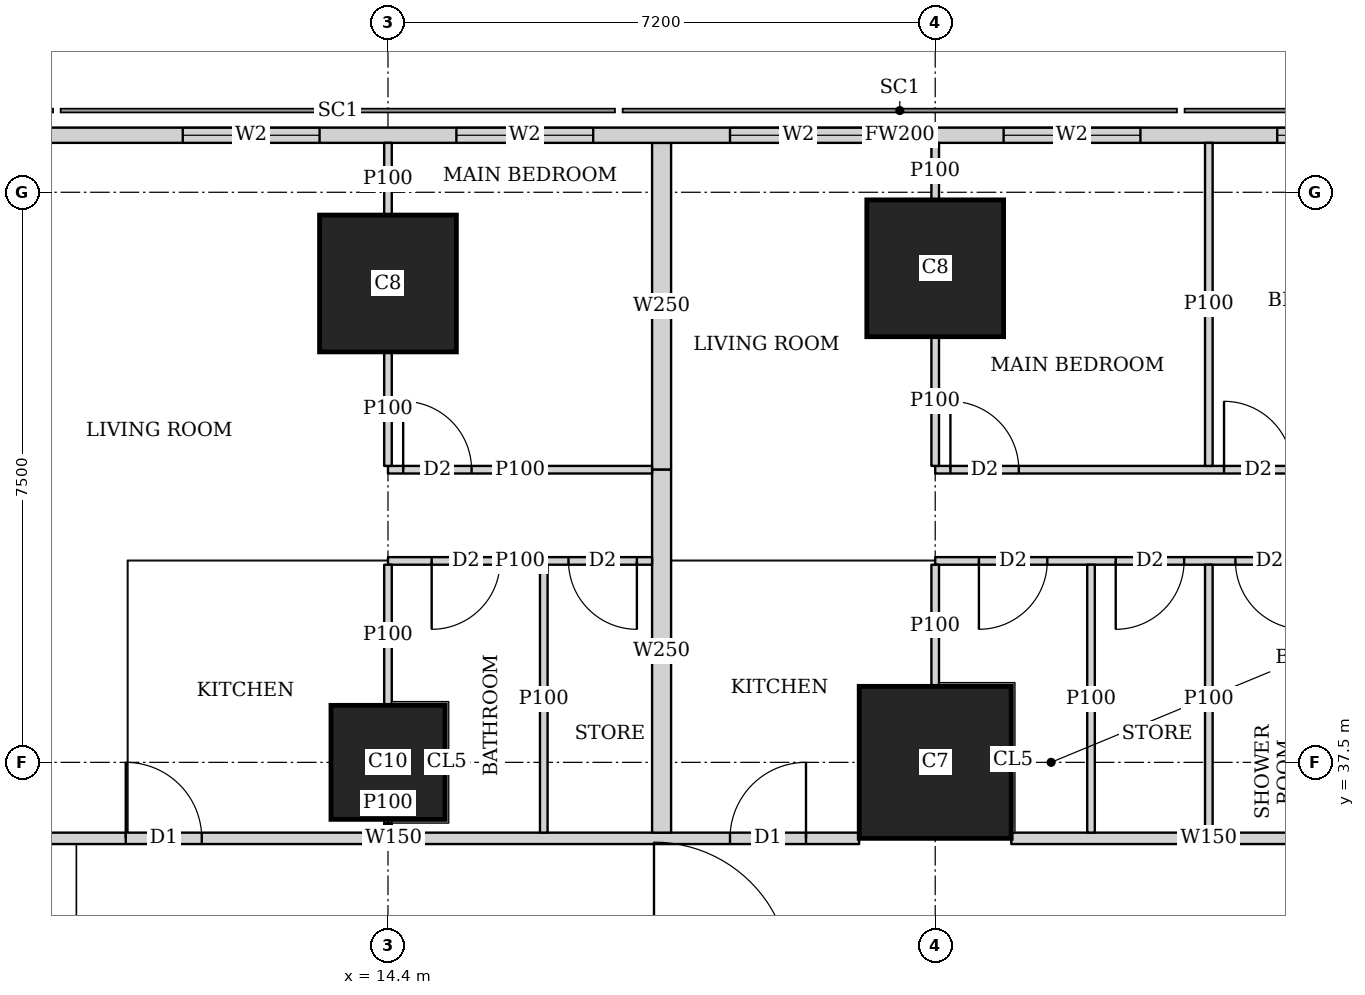
"""IFC4 building model, lengths in metres.
Left out: names, types, materials, properties, quantities, classifications, styles, units other than length and angle.
Written with IfcOpenShell. Run it as: python <this file> out.ifc"""

import sys

from ifc_helpers import new_model, si_unit, direction, frame, frame_2d, origin, origin_2d, place, context, subcontext, project, spatial, rectangle, extrude, element, fill, save


model = new_model("IFC4")
c1 = context("Model", 3, precision=1e-05, world=origin(), true_north=direction((0.0, 1.0)))
c2 = subcontext(c1, "Body", "Model", "MODEL_VIEW")
j1 = project(units=[si_unit("LENGTHUNIT", "METRE"), si_unit("PLANEANGLEUNIT", "RADIAN")], contexts=[c1])
p1 = place(None, origin())
s1 = spatial("IfcSite", under=j1, at=p1, CompositionType="ELEMENT")
p2 = place(p1, origin())
s2 = spatial("IfcBuilding", under=s1, at=p2, CompositionType="ELEMENT")
p3 = place(p2, frame((0.0, 0.0, 135.8)))
s3 = spatial("IfcBuildingStorey", under=s2, at=p3, CompositionType="ELEMENT", Elevation=135.8)
p4 = place(p3, frame((14.4, 37.5, 0.0), z_axis=(0.0, 0.0, 1.0), x_axis=(1.0, 0.0, 0.0)))
e1 = element("IfcColumn", 1, at=p4, inside=s3, PredefinedType="COLUMN", context=c2, shape_type="SweptSolid", body=[
    extrude(rectangle(XDim=1.5, YDim=1.5, at=origin_2d()), origin(), (0.0, 0.0, 1.0), 3.75),
])
p5 = place(p3, frame((21.6, 37.5, 0.0), z_axis=(0.0, 0.0, 1.0), x_axis=(1.0, 0.0, 0.0)))
e2 = element("IfcColumn", 2, at=p5, inside=s3, PredefinedType="COLUMN", context=c2, shape_type="SweptSolid", body=[
    extrude(rectangle(XDim=2.0, YDim=2.0, at=origin_2d()), origin(), (0.0, 0.0, 1.0), 3.75),
])
for number, where, z_axis, x_axis in (
    (3, (14.4, 43.8, 0.0), (0.0, 0.0, 1.0), (1.0, 0.0, 0.0)),
    (4, (21.6, 44.0, 0.0), (0.0, 0.0, 1.0), (1.0, 0.0, 0.0)),
):
    element("IfcColumn", number, at=place(p3, frame(where, z_axis=z_axis, x_axis=x_axis)), inside=s3, PredefinedType="COLUMN", context=c2, shape_type="SweptSolid", body=[
        extrude(rectangle(XDim=1.8, YDim=1.8, at=origin_2d()), origin(), (0.0, 0.0, 1.0), 3.75),
    ])
p6 = place(p3, frame((40.106, 45.75, 0.0), z_axis=(0.0, 0.0, 1.0), x_axis=(-1.0, 0.0, 0.0)))
e5 = element("IfcWall", 5, at=p6, inside=s3, PredefinedType="SOLIDWALL", context=c2, shape_type="SweptSolid", body=[
    extrude(rectangle(XDim=37.943, YDim=0.2, at=frame_2d((18.971, 0.0))), origin(), (0.0, 0.0, 1.0), 3.5),
])
p7 = place(p6, frame((8.606, 0.0, 0.9)))
e6 = element("IfcOpeningElement", 6, at=p7, cuts=e5, PredefinedType="OPENING", context=c2, shape_type="SweptSolid", body=[
    extrude(rectangle(XDim=1.8, YDim=1.5, at=frame_2d((0.9, 0.75))), frame((0.0, 0.11, 0.0), z_axis=(0.0, -1.0, 0.0), x_axis=(1.0, 0.0, 0.0)), (0.0, 0.0, 1.0), 0.22),
])
p8 = place(p6, frame((12.206, 0.0, 0.9)))
e7 = element("IfcOpeningElement", 7, at=p8, cuts=e5, PredefinedType="OPENING", context=c2, shape_type="SweptSolid", body=[
    extrude(rectangle(XDim=1.8, YDim=1.5, at=frame_2d((0.9, 0.75))), frame((0.0, 0.11, 0.0), z_axis=(0.0, -1.0, 0.0), x_axis=(1.0, 0.0, 0.0)), (0.0, 0.0, 1.0), 0.22),
])
p9 = place(p6, frame((15.806, 0.0, 0.9)))
e8 = element("IfcOpeningElement", 8, at=p9, cuts=e5, PredefinedType="OPENING", context=c2, shape_type="SweptSolid", body=[
    extrude(rectangle(XDim=1.8, YDim=1.5, at=frame_2d((0.9, 0.75))), frame((0.0, 0.11, 0.0), z_axis=(0.0, -1.0, 0.0), x_axis=(1.0, 0.0, 0.0)), (0.0, 0.0, 1.0), 0.22),
])
p10 = place(p6, frame((19.406, 0.0, 0.9)))
e9 = element("IfcOpeningElement", 9, at=p10, cuts=e5, PredefinedType="OPENING", context=c2, shape_type="SweptSolid", body=[
    extrude(rectangle(XDim=1.8, YDim=1.5, at=frame_2d((0.9, 0.75))), frame((0.0, 0.11, 0.0), z_axis=(0.0, -1.0, 0.0), x_axis=(1.0, 0.0, 0.0)), (0.0, 0.0, 1.0), 0.22),
])
p11 = place(p6, frame((23.006, 0.0, 0.9)))
e10 = element("IfcOpeningElement", 10, at=p11, cuts=e5, PredefinedType="OPENING", context=c2, shape_type="SweptSolid", body=[
    extrude(rectangle(XDim=1.8, YDim=1.5, at=frame_2d((0.9, 0.75))), frame((0.0, 0.11, 0.0), z_axis=(0.0, -1.0, 0.0), x_axis=(1.0, 0.0, 0.0)), (0.0, 0.0, 1.0), 0.22),
])
p12 = place(p6, frame((26.606, 0.0, 0.9)))
e11 = element("IfcOpeningElement", 11, at=p12, cuts=e5, PredefinedType="OPENING", context=c2, shape_type="SweptSolid", body=[
    extrude(rectangle(XDim=1.8, YDim=1.5, at=frame_2d((0.9, 0.75))), frame((0.0, 0.11, 0.0), z_axis=(0.0, -1.0, 0.0), x_axis=(1.0, 0.0, 0.0)), (0.0, 0.0, 1.0), 0.22),
])
p13 = place(p3, frame((8.35, 36.5, 0.0), z_axis=(0.0, 0.0, 1.0), x_axis=(1.0, 0.0, 0.0)))
e12 = element("IfcWall", 12, at=p13, inside=s3, PredefinedType="SOLIDWALL", context=c2, shape_type="SweptSolid", body=[
    extrude(rectangle(XDim=12.249, YDim=0.15, at=frame_2d((6.125, 0.0))), origin(), (0.0, 0.0, 1.0), 3.5),
])
p14 = place(p13, frame((2.6, 0.0, 0.0)))
e13 = element("IfcOpeningElement", 13, at=p14, cuts=e12, PredefinedType="OPENING", context=c2, shape_type="SweptSolid", body=[
    extrude(rectangle(XDim=1.0, YDim=2.1, at=frame_2d((0.5, 1.05))), frame((0.0, 0.085, 0.0), z_axis=(0.0, -1.0, 0.0), x_axis=(1.0, 0.0, 0.0)), (0.0, 0.0, 1.0), 0.17),
])
p15 = place(p13, frame((10.55, 0.0, 0.0)))
e14 = element("IfcOpeningElement", 14, at=p15, cuts=e12, PredefinedType="OPENING", context=c2, shape_type="SweptSolid", body=[
    extrude(rectangle(XDim=1.0, YDim=2.1, at=frame_2d((0.5, 1.05))), frame((0.0, 0.085, 0.0), z_axis=(0.0, -1.0, 0.0), x_axis=(1.0, 0.0, 0.0)), (0.0, 0.0, 1.0), 0.17),
])
p16 = place(p3, frame((22.601, 36.5, 0.0), z_axis=(0.0, 0.0, 1.0), x_axis=(1.0, 0.0, 0.0)))
e15 = element("IfcWall", 15, at=p16, inside=s3, PredefinedType="SOLIDWALL", context=c2, shape_type="SweptSolid", body=[
    extrude(rectangle(XDim=5.198, YDim=0.15, at=frame_2d((2.599, 0.0))), origin(), (0.0, 0.0, 1.0), 3.5),
])
p17 = place(p3, frame((14.4, 41.35, 0.0), z_axis=(0.0, 0.0, 1.0), x_axis=(1.0, 0.0, 0.0)))
e16 = element("IfcWall", 16, at=p17, inside=s3, PredefinedType="PARTITIONING", context=c2, shape_type="SweptSolid", body=[
    extrude(rectangle(XDim=3.475, YDim=0.1, at=frame_2d((1.738, 0.0))), origin(), (0.0, 0.0, 1.0), 3.5),
])
p18 = place(p17, frame((0.2, 0.0, 0.0)))
e17 = element("IfcOpeningElement", 17, at=p18, cuts=e16, PredefinedType="OPENING", context=c2, shape_type="SweptSolid", body=[
    extrude(rectangle(XDim=0.9, YDim=2.1, at=frame_2d((0.45, 1.05))), frame((0.0, 0.06, 0.0), z_axis=(0.0, -1.0, 0.0), x_axis=(1.0, 0.0, 0.0)), (0.0, 0.0, 1.0), 0.12),
])
p19 = place(p3, frame((14.4, 40.15, 0.0), z_axis=(0.0, 0.0, 1.0), x_axis=(1.0, 0.0, 0.0)))
e18 = element("IfcWall", 18, at=p19, inside=s3, PredefinedType="PARTITIONING", context=c2, shape_type="SweptSolid", body=[
    extrude(rectangle(XDim=3.475, YDim=0.1, at=frame_2d((1.738, 0.0))), origin(), (0.0, 0.0, 1.0), 3.5),
])
p20 = place(p19, frame((0.575, 0.0, 0.0)))
e19 = element("IfcOpeningElement", 19, at=p20, cuts=e18, PredefinedType="OPENING", context=c2, shape_type="SweptSolid", body=[
    extrude(rectangle(XDim=0.9, YDim=2.1, at=frame_2d((0.45, 1.05))), frame((0.0, 0.06, 0.0), z_axis=(0.0, -1.0, 0.0), x_axis=(1.0, 0.0, 0.0)), (0.0, 0.0, 1.0), 0.12),
])
p21 = place(p19, frame((2.375, 0.0, 0.0)))
e20 = element("IfcOpeningElement", 20, at=p21, cuts=e18, PredefinedType="OPENING", context=c2, shape_type="SweptSolid", body=[
    extrude(rectangle(XDim=0.9, YDim=2.1, at=frame_2d((0.45, 1.05))), frame((0.0, 0.06, 0.0), z_axis=(0.0, -1.0, 0.0), x_axis=(1.0, 0.0, 0.0)), (0.0, 0.0, 1.0), 0.12),
])
p22 = place(p3, frame((14.4, 41.4, 0.0), z_axis=(0.0, 0.0, 1.0), x_axis=(0.0, 1.0, 0.0)))
e21 = element("IfcWall", 21, at=p22, inside=s3, PredefinedType="PARTITIONING", context=c2, shape_type="SweptSolid", body=[
    extrude(rectangle(XDim=1.499, YDim=0.1, at=frame_2d((0.75, 0.0))), origin(), (0.0, 0.0, 1.0), 3.5),
])
p23 = place(p3, frame((14.4, 44.701, 0.0), z_axis=(0.0, 0.0, 1.0), x_axis=(0.0, 1.0, 0.0)))
e22 = element("IfcWall", 22, at=p23, inside=s3, PredefinedType="PARTITIONING", context=c2, shape_type="SweptSolid", body=[
    extrude(rectangle(XDim=0.949, YDim=0.1, at=frame_2d((0.475, 0.0))), origin(), (0.0, 0.0, 1.0), 3.5),
])
p24 = place(p3, frame((14.4, 36.575, 0.0), z_axis=(0.0, 0.0, 1.0), x_axis=(0.0, 1.0, 0.0)))
e23 = element("IfcWall", 23, at=p24, inside=s3, PredefinedType="PARTITIONING", context=c2, shape_type="SweptSolid", body=[
    extrude(rectangle(XDim=0.174, YDim=0.1, at=frame_2d((0.087, 0.0))), origin(), (0.0, 0.0, 1.0), 3.5),
])
p25 = place(p3, frame((14.4, 38.251, 0.0), z_axis=(0.0, 0.0, 1.0), x_axis=(0.0, 1.0, 0.0)))
e24 = element("IfcWall", 24, at=p25, inside=s3, PredefinedType="PARTITIONING", context=c2, shape_type="SweptSolid", body=[
    extrude(rectangle(XDim=1.849, YDim=0.1, at=frame_2d((0.925, 0.0))), origin(), (0.0, 0.0, 1.0), 3.5),
])
p26 = place(p3, frame((16.45, 36.575, 0.0), z_axis=(0.0, 0.0, 1.0), x_axis=(0.0, 1.0, 0.0)))
e25 = element("IfcWall", 25, at=p26, inside=s3, PredefinedType="PARTITIONING", context=c2, shape_type="SweptSolid", body=[
    extrude(rectangle(XDim=3.525, YDim=0.1, at=frame_2d((1.763, 0.0))), origin(), (0.0, 0.0, 1.0), 3.5),
])
p27 = place(p3, frame((21.6, 41.35, 0.0), z_axis=(0.0, 0.0, 1.0), x_axis=(1.0, 0.0, 0.0)))
e26 = element("IfcWall", 26, at=p27, inside=s3, PredefinedType="PARTITIONING", context=c2, shape_type="SweptSolid", body=[
    extrude(rectangle(XDim=12.253, YDim=0.1, at=frame_2d((6.126, 0.0))), origin(), (0.0, 0.0, 1.0), 3.5),
])
p28 = place(p27, frame((0.2, 0.0, 0.0)))
e27 = element("IfcOpeningElement", 27, at=p28, cuts=e26, PredefinedType="OPENING", context=c2, shape_type="SweptSolid", body=[
    extrude(rectangle(XDim=0.9, YDim=2.1, at=frame_2d((0.45, 1.05))), frame((0.0, 0.06, 0.0), z_axis=(0.0, -1.0, 0.0), x_axis=(1.0, 0.0, 0.0)), (0.0, 0.0, 1.0), 0.12),
])
p29 = place(p27, frame((3.8, 0.0, 0.0)))
e28 = element("IfcOpeningElement", 28, at=p29, cuts=e26, PredefinedType="OPENING", context=c2, shape_type="SweptSolid", body=[
    extrude(rectangle(XDim=0.9, YDim=2.1, at=frame_2d((0.45, 1.05))), frame((0.0, 0.06, 0.0), z_axis=(0.0, -1.0, 0.0), x_axis=(1.0, 0.0, 0.0)), (0.0, 0.0, 1.0), 0.12),
])
p30 = place(p27, frame((7.4, 0.0, 0.0)))
e29 = element("IfcOpeningElement", 29, at=p30, cuts=e26, PredefinedType="OPENING", context=c2, shape_type="SweptSolid", body=[
    extrude(rectangle(XDim=0.9, YDim=2.1, at=frame_2d((0.45, 1.05))), frame((0.0, 0.06, 0.0), z_axis=(0.0, -1.0, 0.0), x_axis=(1.0, 0.0, 0.0)), (0.0, 0.0, 1.0), 0.12),
])
p31 = place(p3, frame((21.6, 40.15, 0.0), z_axis=(0.0, 0.0, 1.0), x_axis=(1.0, 0.0, 0.0)))
e30 = element("IfcWall", 30, at=p31, inside=s3, PredefinedType="PARTITIONING", context=c2, shape_type="SweptSolid", body=[
    extrude(rectangle(XDim=12.48, YDim=0.1, at=frame_2d((6.24, 0.0))), origin(), (0.0, 0.0, 1.0), 3.5),
])
p32 = place(p31, frame((0.575, 0.0, 0.0)))
e31 = element("IfcOpeningElement", 31, at=p32, cuts=e30, PredefinedType="OPENING", context=c2, shape_type="SweptSolid", body=[
    extrude(rectangle(XDim=0.9, YDim=2.1, at=frame_2d((0.45, 1.05))), frame((0.0, 0.06, 0.0), z_axis=(0.0, -1.0, 0.0), x_axis=(1.0, 0.0, 0.0)), (0.0, 0.0, 1.0), 0.12),
])
p33 = place(p31, frame((3.95, 0.0, 0.0)))
e32 = element("IfcOpeningElement", 32, at=p33, cuts=e30, PredefinedType="OPENING", context=c2, shape_type="SweptSolid", body=[
    extrude(rectangle(XDim=0.9, YDim=2.1, at=frame_2d((0.45, 1.05))), frame((0.0, 0.06, 0.0), z_axis=(0.0, -1.0, 0.0), x_axis=(1.0, 0.0, 0.0)), (0.0, 0.0, 1.0), 0.12),
])
p34 = place(p31, frame((7.6, 0.0, 0.0)))
e33 = element("IfcOpeningElement", 33, at=p34, cuts=e30, PredefinedType="OPENING", context=c2, shape_type="SweptSolid", body=[
    extrude(rectangle(XDim=0.9, YDim=2.1, at=frame_2d((0.45, 1.05))), frame((0.0, 0.06, 0.0), z_axis=(0.0, -1.0, 0.0), x_axis=(1.0, 0.0, 0.0)), (0.0, 0.0, 1.0), 0.12),
])
p35 = place(p31, frame((11.43, 0.0, 0.0)))
e34 = element("IfcOpeningElement", 34, at=p35, cuts=e30, PredefinedType="OPENING", context=c2, shape_type="SweptSolid", body=[
    extrude(rectangle(XDim=0.9, YDim=2.1, at=frame_2d((0.45, 1.05))), frame((0.0, 0.06, 0.0), z_axis=(0.0, -1.0, 0.0), x_axis=(1.0, 0.0, 0.0)), (0.0, 0.0, 1.0), 0.12),
])
p36 = place(p31, frame((2.375, 0.0, 0.0)))
e35 = element("IfcOpeningElement", 35, at=p36, cuts=e30, PredefinedType="OPENING", context=c2, shape_type="SweptSolid", body=[
    extrude(rectangle(XDim=0.9, YDim=2.1, at=frame_2d((0.45, 1.05))), frame((0.0, 0.06, 0.0), z_axis=(0.0, -1.0, 0.0), x_axis=(1.0, 0.0, 0.0)), (0.0, 0.0, 1.0), 0.12),
])
p37 = place(p31, frame((5.75, 0.0, 0.0)))
e36 = element("IfcOpeningElement", 36, at=p37, cuts=e30, PredefinedType="OPENING", context=c2, shape_type="SweptSolid", body=[
    extrude(rectangle(XDim=0.9, YDim=2.1, at=frame_2d((0.45, 1.05))), frame((0.0, 0.06, 0.0), z_axis=(0.0, -1.0, 0.0), x_axis=(1.0, 0.0, 0.0)), (0.0, 0.0, 1.0), 0.12),
])
p38 = place(p31, frame((9.4, 0.0, 0.0)))
e37 = element("IfcOpeningElement", 37, at=p38, cuts=e30, PredefinedType="OPENING", context=c2, shape_type="SweptSolid", body=[
    extrude(rectangle(XDim=0.9, YDim=2.1, at=frame_2d((0.45, 1.05))), frame((0.0, 0.06, 0.0), z_axis=(0.0, -1.0, 0.0), x_axis=(1.0, 0.0, 0.0)), (0.0, 0.0, 1.0), 0.12),
])
p39 = place(p3, frame((21.6, 41.4, 0.0), z_axis=(0.0, 0.0, 1.0), x_axis=(0.0, 1.0, 0.0)))
e38 = element("IfcWall", 38, at=p39, inside=s3, PredefinedType="PARTITIONING", context=c2, shape_type="SweptSolid", body=[
    extrude(rectangle(XDim=1.699, YDim=0.1, at=frame_2d((0.85, 0.0))), origin(), (0.0, 0.0, 1.0), 3.5),
])
p40 = place(p3, frame((21.6, 44.901, 0.0), z_axis=(0.0, 0.0, 1.0), x_axis=(0.0, 1.0, 0.0)))
e39 = element("IfcWall", 39, at=p40, inside=s3, PredefinedType="PARTITIONING", context=c2, shape_type="SweptSolid", body=[
    extrude(rectangle(XDim=0.749, YDim=0.1, at=frame_2d((0.375, 0.0))), origin(), (0.0, 0.0, 1.0), 3.5),
])
p41 = place(p3, frame((25.2, 41.4, 0.0), z_axis=(0.0, 0.0, 1.0), x_axis=(0.0, 1.0, 0.0)))
e40 = element("IfcWall", 40, at=p41, inside=s3, PredefinedType="PARTITIONING", context=c2, shape_type="SweptSolid", body=[
    extrude(rectangle(XDim=4.25, YDim=0.1, at=frame_2d((2.125, 0.0))), origin(), (0.0, 0.0, 1.0), 2.1),
])
p42 = place(p3, frame((21.6, 38.501, 0.0), z_axis=(0.0, 0.0, 1.0), x_axis=(0.0, 1.0, 0.0)))
e41 = element("IfcWall", 41, at=p42, inside=s3, PredefinedType="PARTITIONING", context=c2, shape_type="SweptSolid", body=[
    extrude(rectangle(XDim=1.599, YDim=0.1, at=frame_2d((0.8, 0.0))), origin(), (0.0, 0.0, 1.0), 3.5),
])
for number, where, z_axis, x_axis in (
    (42, (25.2, 36.575, 0.0), (0.0, 0.0, 1.0), (0.0, 1.0, 0.0)),
    (43, (23.65, 36.575, 0.0), (0.0, 0.0, 1.0), (0.0, 1.0, 0.0)),
):
    element("IfcWall", number, at=place(p3, frame(where, z_axis=z_axis, x_axis=x_axis)), inside=s3, PredefinedType="PARTITIONING", context=c2, shape_type="SweptSolid", body=[
        extrude(rectangle(XDim=3.525, YDim=0.1, at=frame_2d((1.763, 0.0))), origin(), (0.0, 0.0, 1.0), 3.5),
    ])
p43 = place(p3, frame((18.0, 41.35, 0.0), z_axis=(0.0, 0.0, 1.0), x_axis=(0.0, 1.0, 0.0)))
e44 = element("IfcWall", 44, at=p43, inside=s3, PredefinedType="SOLIDWALL", context=c2, shape_type="SweptSolid", body=[
    extrude(rectangle(XDim=4.3, YDim=0.25, at=frame_2d((2.15, 0.0))), origin(), (0.0, 0.0, 1.0), 2.1),
])
p44 = place(p3, frame((18.0, 36.575, 0.0), z_axis=(0.0, 0.0, 1.0), x_axis=(0.0, 1.0, 0.0)))
e45 = element("IfcWall", 45, at=p44, inside=s3, PredefinedType="SOLIDWALL", context=c2, shape_type="SweptSolid", body=[
    extrude(rectangle(XDim=4.775, YDim=0.25, at=frame_2d((2.388, 0.0))), origin(), (0.0, 0.0, 1.0), 3.5),
])
p45 = place(p8, origin())
e46 = element("IfcWindow", 46, at=p45, inside=s3, PartitioningType="SINGLE_PANEL", PredefinedType="WINDOW", context=c2, shape_type="SweptSolid", body=[
    extrude(rectangle(XDim=1.8, YDim=1.5, at=frame_2d((0.9, 0.75))), frame((0.0, 0.03, 0.0), z_axis=(0.0, -1.0, 0.0), x_axis=(1.0, 0.0, 0.0)), (0.0, 0.0, 1.0), 0.06),
])
fill(e7, e46)
p46 = place(p9, origin())
e47 = element("IfcWindow", 47, at=p46, inside=s3, PartitioningType="SINGLE_PANEL", PredefinedType="WINDOW", context=c2, shape_type="SweptSolid", body=[
    extrude(rectangle(XDim=1.8, YDim=1.5, at=frame_2d((0.9, 0.75))), frame((0.0, 0.03, 0.0), z_axis=(0.0, -1.0, 0.0), x_axis=(1.0, 0.0, 0.0)), (0.0, 0.0, 1.0), 0.06),
])
fill(e8, e47)
p47 = place(p10, origin())
e48 = element("IfcWindow", 48, at=p47, inside=s3, PartitioningType="SINGLE_PANEL", PredefinedType="WINDOW", context=c2, shape_type="SweptSolid", body=[
    extrude(rectangle(XDim=1.8, YDim=1.5, at=frame_2d((0.9, 0.75))), frame((0.0, 0.03, 0.0), z_axis=(0.0, -1.0, 0.0), x_axis=(1.0, 0.0, 0.0)), (0.0, 0.0, 1.0), 0.06),
])
fill(e9, e48)
p48 = place(p11, origin())
e49 = element("IfcWindow", 49, at=p48, inside=s3, PartitioningType="SINGLE_PANEL", PredefinedType="WINDOW", context=c2, shape_type="SweptSolid", body=[
    extrude(rectangle(XDim=1.8, YDim=1.5, at=frame_2d((0.9, 0.75))), frame((0.0, 0.03, 0.0), z_axis=(0.0, -1.0, 0.0), x_axis=(1.0, 0.0, 0.0)), (0.0, 0.0, 1.0), 0.06),
])
fill(e10, e49)
p49 = place(p12, origin())
e50 = element("IfcWindow", 50, at=p49, inside=s3, PartitioningType="SINGLE_PANEL", PredefinedType="WINDOW", context=c2, shape_type="SweptSolid", body=[
    extrude(rectangle(XDim=1.8, YDim=1.5, at=frame_2d((0.9, 0.75))), frame((0.0, 0.03, 0.0), z_axis=(0.0, -1.0, 0.0), x_axis=(1.0, 0.0, 0.0)), (0.0, 0.0, 1.0), 0.06),
])
fill(e11, e50)
p50 = place(p18, origin())
e51 = element("IfcDoor", 51, at=p50, inside=s3, OperationType="SINGLE_SWING_LEFT", PredefinedType="DOOR", context=c2, shape_type="SweptSolid", body=[
    extrude(rectangle(XDim=0.9, YDim=2.1, at=frame_2d((0.45, 1.05))), frame((0.0, 0.025, 0.0), z_axis=(0.0, -1.0, 0.0), x_axis=(1.0, 0.0, 0.0)), (0.0, 0.0, 1.0), 0.05),
])
fill(e17, e51)
p51 = place(p20, origin())
e52 = element("IfcDoor", 52, at=p51, inside=s3, OperationType="SINGLE_SWING_RIGHT", PredefinedType="DOOR", context=c2, shape_type="SweptSolid", body=[
    extrude(rectangle(XDim=0.9, YDim=2.1, at=frame_2d((0.45, 1.05))), frame((0.0, 0.025, 0.0), z_axis=(0.0, -1.0, 0.0), x_axis=(1.0, 0.0, 0.0)), (0.0, 0.0, 1.0), 0.05),
])
fill(e19, e52)
p52 = place(p21, origin())
e53 = element("IfcDoor", 53, at=p52, inside=s3, OperationType="SINGLE_SWING_LEFT", PredefinedType="DOOR", context=c2, shape_type="SweptSolid", body=[
    extrude(rectangle(XDim=0.9, YDim=2.1, at=frame_2d((0.45, 1.05))), frame((0.0, 0.025, 0.0), z_axis=(0.0, -1.0, 0.0), x_axis=(1.0, 0.0, 0.0)), (0.0, 0.0, 1.0), 0.05),
])
fill(e20, e53)
p53 = place(p14, origin())
e54 = element("IfcDoor", 54, at=p53, inside=s3, OperationType="SINGLE_SWING_LEFT", PredefinedType="DOOR", context=c2, shape_type="SweptSolid", body=[
    extrude(rectangle(XDim=1.0, YDim=2.1, at=frame_2d((0.5, 1.05))), frame((0.0, 0.025, 0.0), z_axis=(0.0, -1.0, 0.0), x_axis=(1.0, 0.0, 0.0)), (0.0, 0.0, 1.0), 0.05),
])
fill(e13, e54)
p54 = place(p28, origin())
e55 = element("IfcDoor", 55, at=p54, inside=s3, OperationType="SINGLE_SWING_LEFT", PredefinedType="DOOR", context=c2, shape_type="SweptSolid", body=[
    extrude(rectangle(XDim=0.9, YDim=2.1, at=frame_2d((0.45, 1.05))), frame((0.0, 0.025, 0.0), z_axis=(0.0, -1.0, 0.0), x_axis=(1.0, 0.0, 0.0)), (0.0, 0.0, 1.0), 0.05),
])
fill(e27, e55)
p55 = place(p29, origin())
e56 = element("IfcDoor", 56, at=p55, inside=s3, OperationType="SINGLE_SWING_LEFT", PredefinedType="DOOR", context=c2, shape_type="SweptSolid", body=[
    extrude(rectangle(XDim=0.9, YDim=2.1, at=frame_2d((0.45, 1.05))), frame((0.0, 0.025, 0.0), z_axis=(0.0, -1.0, 0.0), x_axis=(1.0, 0.0, 0.0)), (0.0, 0.0, 1.0), 0.05),
])
fill(e28, e56)
p56 = place(p32, origin())
e57 = element("IfcDoor", 57, at=p56, inside=s3, OperationType="SINGLE_SWING_RIGHT", PredefinedType="DOOR", context=c2, shape_type="SweptSolid", body=[
    extrude(rectangle(XDim=0.9, YDim=2.1, at=frame_2d((0.45, 1.05))), frame((0.0, 0.025, 0.0), z_axis=(0.0, -1.0, 0.0), x_axis=(1.0, 0.0, 0.0)), (0.0, 0.0, 1.0), 0.05),
])
fill(e31, e57)
p57 = place(p33, origin())
e58 = element("IfcDoor", 58, at=p57, inside=s3, OperationType="SINGLE_SWING_LEFT", PredefinedType="DOOR", context=c2, shape_type="SweptSolid", body=[
    extrude(rectangle(XDim=0.9, YDim=2.1, at=frame_2d((0.45, 1.05))), frame((0.0, 0.025, 0.0), z_axis=(0.0, -1.0, 0.0), x_axis=(1.0, 0.0, 0.0)), (0.0, 0.0, 1.0), 0.05),
])
fill(e32, e58)
p58 = place(p36, origin())
e59 = element("IfcDoor", 59, at=p58, inside=s3, OperationType="SINGLE_SWING_RIGHT", PredefinedType="DOOR", context=c2, shape_type="SweptSolid", body=[
    extrude(rectangle(XDim=0.9, YDim=2.1, at=frame_2d((0.45, 1.05))), frame((0.0, 0.025, 0.0), z_axis=(0.0, -1.0, 0.0), x_axis=(1.0, 0.0, 0.0)), (0.0, 0.0, 1.0), 0.05),
])
fill(e35, e59)
p59 = place(p15, origin())
e60 = element("IfcDoor", 60, at=p59, inside=s3, OperationType="SINGLE_SWING_RIGHT", PredefinedType="DOOR", context=c2, shape_type="SweptSolid", body=[
    extrude(rectangle(XDim=1.0, YDim=2.1, at=frame_2d((0.5, 1.05))), frame((0.0, 0.025, 0.0), z_axis=(0.0, -1.0, 0.0), x_axis=(1.0, 0.0, 0.0)), (0.0, 0.0, 1.0), 0.05),
])
fill(e14, e60)
save(model, sys.argv[1])
